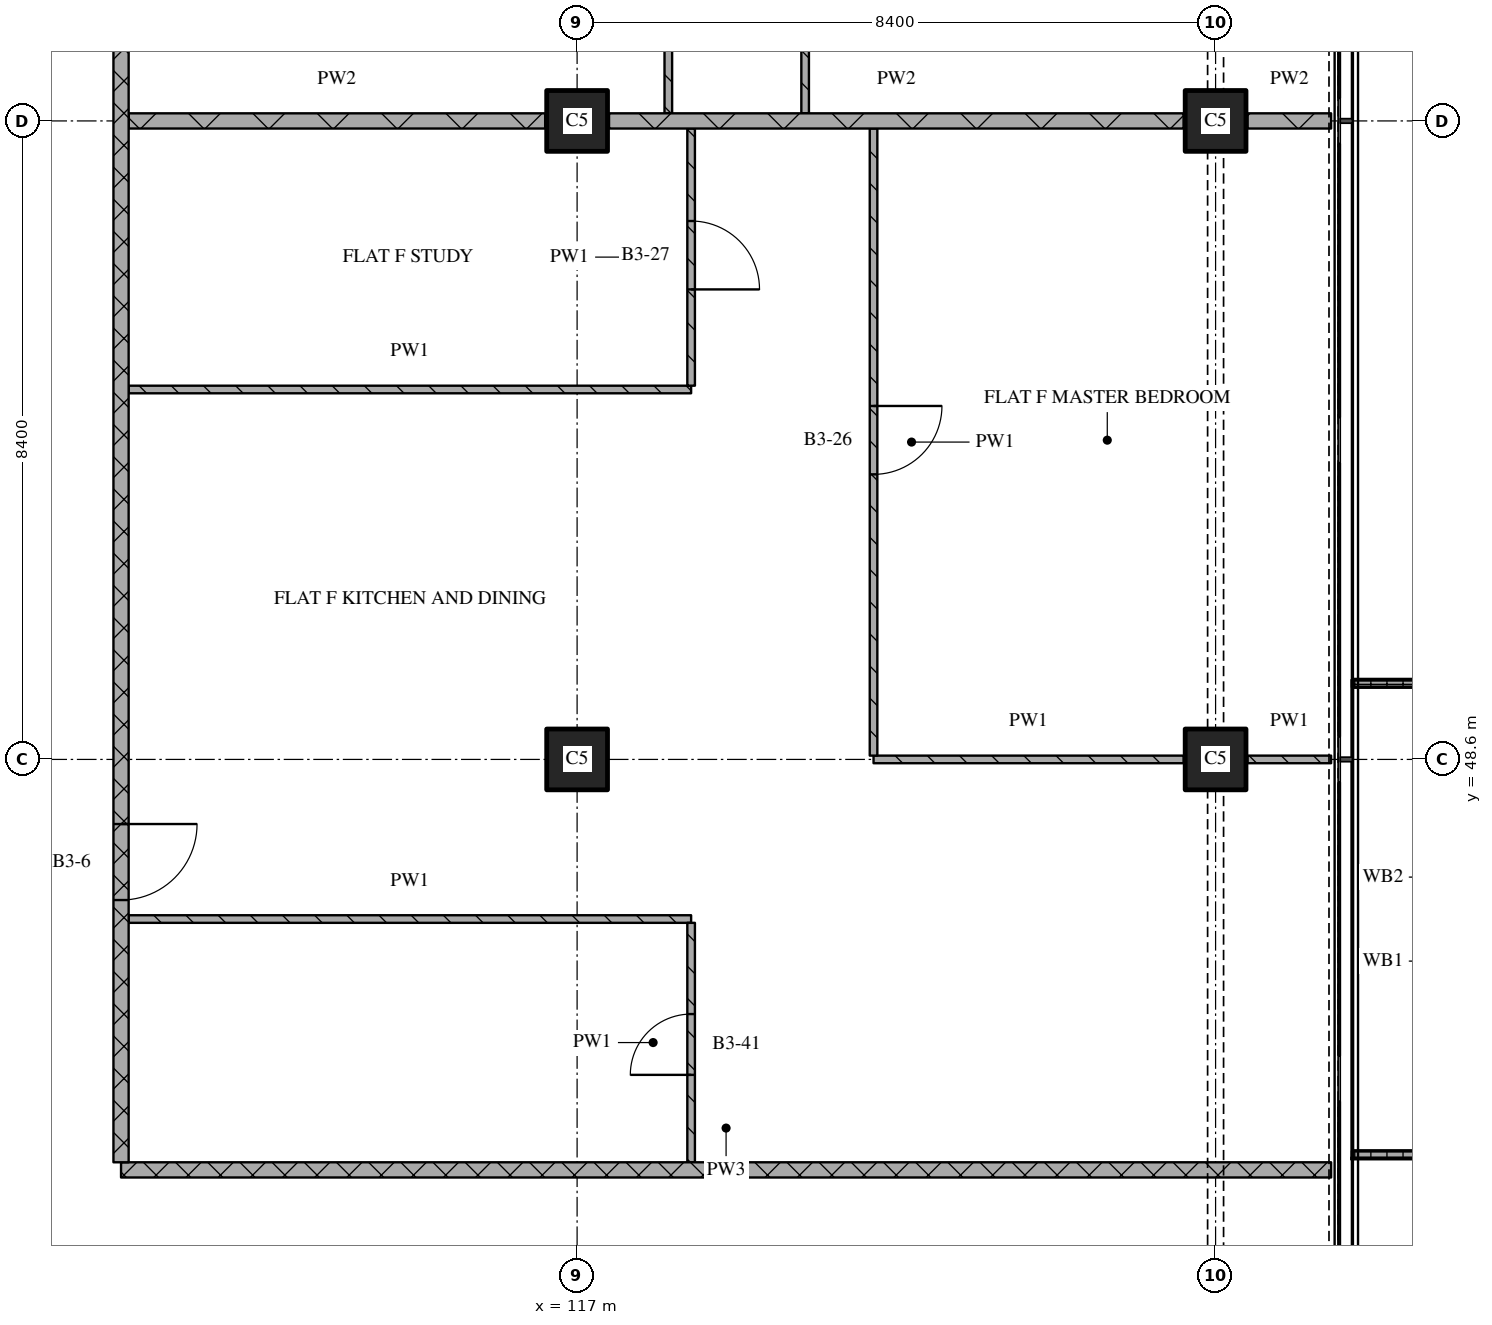
"""IFC4 building model, lengths in metres.
Left out: names, types, materials, properties, quantities, classifications, styles, units other than length and angle.
Written with IfcOpenShell. Run it as: python <this file> out.ifc"""

import sys

from ifc_helpers import new_model, si_unit, direction, frame, frame_2d, origin, origin_2d, place, context, subcontext, project, spatial, polyline, rectangle, outline, extrude, element, fill, save


model = new_model("IFC4")
c1 = context("Model", 3, precision=1e-05, world=origin(), true_north=direction((0.0, 1.0)))
c2 = subcontext(c1, "Body", "Model", "MODEL_VIEW")
j1 = project(units=[si_unit("LENGTHUNIT", "METRE"), si_unit("PLANEANGLEUNIT", "RADIAN")], contexts=[c1])
p1 = place(None, origin())
s1 = spatial("IfcSite", under=j1, at=p1, CompositionType="ELEMENT")
p2 = place(p1, origin())
s2 = spatial("IfcBuilding", under=s1, at=p2, CompositionType="ELEMENT")
p3 = place(p2, frame((0.0, 0.0, 116.85)))
s3 = spatial("IfcBuildingStorey", under=s2, at=p3, CompositionType="ELEMENT", Elevation=116.85)
for number, where, z_axis, x_axis in (
    (1, (117.0, 48.6, 0.0), (0.0, 0.0, 1.0), (1.0, 0.0, 0.0)),
    (2, (117.0, 57.0, 0.0), (0.0, 0.0, 1.0), (1.0, 0.0, 0.0)),
    (3, (125.4, 48.6, 0.0), (0.0, 0.0, 1.0), (1.0, 0.0, 0.0)),
    (4, (125.4, 57.0, 0.0), (0.0, 0.0, 1.0), (1.0, 0.0, 0.0)),
):
    element("IfcColumn", number, at=place(p3, frame(where, z_axis=z_axis, x_axis=x_axis)), inside=s3, PredefinedType="COLUMN", context=c2, shape_type="SweptSolid", body=[
        extrude(rectangle(XDim=0.8, YDim=0.8, at=origin_2d()), origin(), (0.0, 0.0, 1.0), 3.6),
    ])
p4 = place(p3, origin())
e5 = element("IfcWall", 5, at=p4, inside=s3, PredefinedType="SOLIDWALL", context=c2, shape_type="SweptSolid", body=[
    extrude(outline(polyline([(127.2, 43.35), (127.2, 43.45), (128.967, 43.45), (128.967, 49.55), (127.2, 49.55), (127.2, 49.65), (129.067, 49.65), (129.067, 43.35), (127.2, 43.35)])), origin(), (0.0, 0.0, 1.0), 1.0),
])
p5 = place(p3, frame((111.0, 43.2, 0.0), z_axis=(0.0, 0.0, 1.0), x_axis=(1.0, 0.0, 0.0)))
e6 = element("IfcWall", 6, at=p5, inside=s3, PredefinedType="PARTITIONING", context=c2, shape_type="SweptSolid", body=[
    extrude(rectangle(XDim=15.92, YDim=0.2, at=frame_2d((7.96, 0.0))), origin(), (0.0, 0.0, 1.0), 3.32),
])
p6 = place(p3, frame((111.1, 46.5, 0.0), z_axis=(0.0, 0.0, 1.0), x_axis=(1.0, 0.0, 0.0)))
e7 = element("IfcWall", 7, at=p6, inside=s3, PredefinedType="PARTITIONING", context=c2, shape_type="SweptSolid", body=[
    extrude(rectangle(XDim=7.4, YDim=0.1, at=frame_2d((3.7, 0.0))), origin(), (0.0, 0.0, 1.0), 3.32),
])
p7 = place(p3, frame((120.9, 48.6, 0.0), z_axis=(0.0, 0.0, 1.0), x_axis=(1.0, 0.0, 0.0)))
e8 = element("IfcWall", 8, at=p7, inside=s3, PredefinedType="PARTITIONING", context=c2, shape_type="SweptSolid", body=[
    extrude(rectangle(XDim=4.08, YDim=0.1, at=frame_2d((2.04, 0.0))), origin(), (0.0, 0.0, 1.0), 3.32),
])
p8 = place(p3, frame((125.82, 48.6, 0.0), z_axis=(0.0, 0.0, 1.0), x_axis=(1.0, 0.0, 0.0)))
e9 = element("IfcWall", 9, at=p8, inside=s3, PredefinedType="PARTITIONING", context=c2, shape_type="SweptSolid", body=[
    extrude(rectangle(XDim=1.1, YDim=0.1, at=frame_2d((0.55, 0.0))), origin(), (0.0, 0.0, 1.0), 3.32),
])
p9 = place(p3, frame((111.1, 53.467, 0.0), z_axis=(0.0, 0.0, 1.0), x_axis=(1.0, 0.0, 0.0)))
e10 = element("IfcWall", 10, at=p9, inside=s3, PredefinedType="PARTITIONING", context=c2, shape_type="SweptSolid", body=[
    extrude(rectangle(XDim=7.4, YDim=0.1, at=frame_2d((3.7, 0.0))), origin(), (0.0, 0.0, 1.0), 3.32),
])
p10 = place(p3, frame((111.1, 57.0, 0.0), z_axis=(0.0, 0.0, 1.0), x_axis=(1.0, 0.0, 0.0)))
e11 = element("IfcWall", 11, at=p10, inside=s3, PredefinedType="PARTITIONING", context=c2, shape_type="SweptSolid", body=[
    extrude(rectangle(XDim=5.48, YDim=0.2, at=frame_2d((2.74, 0.0))), origin(), (0.0, 0.0, 1.0), 3.32),
])
p11 = place(p3, frame((117.42, 57.0, 0.0), z_axis=(0.0, 0.0, 1.0), x_axis=(1.0, 0.0, 0.0)))
e12 = element("IfcWall", 12, at=p11, inside=s3, PredefinedType="PARTITIONING", context=c2, shape_type="SweptSolid", body=[
    extrude(rectangle(XDim=7.56, YDim=0.2, at=frame_2d((3.78, 0.0))), origin(), (0.0, 0.0, 1.0), 3.32),
])
p12 = place(p3, frame((125.82, 57.0, 0.0), z_axis=(0.0, 0.0, 1.0), x_axis=(1.0, 0.0, 0.0)))
e13 = element("IfcWall", 13, at=p12, inside=s3, PredefinedType="PARTITIONING", context=c2, shape_type="SweptSolid", body=[
    extrude(rectangle(XDim=1.1, YDim=0.2, at=frame_2d((0.55, 0.0))), origin(), (0.0, 0.0, 1.0), 3.32),
])
p13 = place(p3, frame((111.0, 75.32, 0.0), z_axis=(0.0, 0.0, 1.0), x_axis=(0.0, -1.0, 0.0)))
e14 = element("IfcWall", 14, at=p13, inside=s3, PredefinedType="PARTITIONING", context=c2, shape_type="SweptSolid", body=[
    extrude(rectangle(XDim=32.02, YDim=0.2, at=frame_2d((16.01, 0.0))), origin(), (0.0, 0.0, 1.0), 3.32),
])
p14 = place(p13, frame((11.37, 0.0, 0.0)))
e15 = element("IfcOpeningElement", 15, at=p14, cuts=e14, PredefinedType="OPENING", context=c2, shape_type="SweptSolid", body=[
    extrude(rectangle(XDim=1.0, YDim=2.1, at=frame_2d((0.5, 1.05))), frame((0.0, 0.11, 0.0), z_axis=(0.0, -1.0, 0.0), x_axis=(1.0, 0.0, 0.0)), (0.0, 0.0, 1.0), 0.22),
])
p15 = place(p13, frame((27.57, 0.0, 0.0)))
e16 = element("IfcOpeningElement", 16, at=p15, cuts=e14, PredefinedType="OPENING", context=c2, shape_type="SweptSolid", body=[
    extrude(rectangle(XDim=1.0, YDim=2.1, at=frame_2d((0.5, 1.05))), frame((0.0, 0.11, 0.0), z_axis=(0.0, -1.0, 0.0), x_axis=(1.0, 0.0, 0.0)), (0.0, 0.0, 1.0), 0.22),
])
p16 = place(p3, frame((118.2, 57.1, 0.0), z_axis=(0.0, 0.0, 1.0), x_axis=(0.0, 1.0, 0.0)))
e17 = element("IfcWall", 17, at=p16, inside=s3, PredefinedType="PARTITIONING", context=c2, shape_type="SweptSolid", body=[
    extrude(rectangle(XDim=5.55, YDim=0.1, at=frame_2d((2.775, 0.0))), origin(), (0.0, 0.0, 1.0), 3.32),
])
p17 = place(p16, frame((1.3, 0.0, 0.0)))
e18 = element("IfcOpeningElement", 18, at=p17, cuts=e17, PredefinedType="OPENING", context=c2, shape_type="SweptSolid", body=[
    extrude(rectangle(XDim=0.8, YDim=2.1, at=frame_2d((0.4, 1.05))), frame((0.0, 0.06, 0.0), z_axis=(0.0, -1.0, 0.0), x_axis=(1.0, 0.0, 0.0)), (0.0, 0.0, 1.0), 0.12),
])
p18 = place(p16, frame((4.15, 0.0, 0.0)))
e19 = element("IfcOpeningElement", 19, at=p18, cuts=e17, PredefinedType="OPENING", context=c2, shape_type="SweptSolid", body=[
    extrude(rectangle(XDim=0.8, YDim=2.1, at=frame_2d((0.4, 1.05))), frame((0.0, 0.06, 0.0), z_axis=(0.0, -1.0, 0.0), x_axis=(1.0, 0.0, 0.0)), (0.0, 0.0, 1.0), 0.12),
])
p19 = place(p3, frame((118.5, 43.3, 0.0), z_axis=(0.0, 0.0, 1.0), x_axis=(0.0, 1.0, 0.0)))
e20 = element("IfcWall", 20, at=p19, inside=s3, PredefinedType="PARTITIONING", context=c2, shape_type="SweptSolid", body=[
    extrude(rectangle(XDim=3.15, YDim=0.1, at=frame_2d((1.575, 0.0))), origin(), (0.0, 0.0, 1.0), 3.32),
])
p20 = place(p19, frame((1.15, 0.0, 0.0)))
e21 = element("IfcOpeningElement", 21, at=p20, cuts=e20, PredefinedType="OPENING", context=c2, shape_type="SweptSolid", body=[
    extrude(rectangle(XDim=0.8, YDim=2.1, at=frame_2d((0.4, 1.05))), frame((0.0, 0.06, 0.0), z_axis=(0.0, -1.0, 0.0), x_axis=(1.0, 0.0, 0.0)), (0.0, 0.0, 1.0), 0.12),
])
p21 = place(p3, frame((118.5, 53.517, 0.0), z_axis=(0.0, 0.0, 1.0), x_axis=(0.0, 1.0, 0.0)))
e22 = element("IfcWall", 22, at=p21, inside=s3, PredefinedType="PARTITIONING", context=c2, shape_type="SweptSolid", body=[
    extrude(rectangle(XDim=3.383, YDim=0.1, at=frame_2d((1.692, 0.0))), origin(), (0.0, 0.0, 1.0), 3.32),
])
p22 = place(p21, frame((1.267, 0.0, 0.0)))
e23 = element("IfcOpeningElement", 23, at=p22, cuts=e22, PredefinedType="OPENING", context=c2, shape_type="SweptSolid", body=[
    extrude(rectangle(XDim=0.9, YDim=2.1, at=frame_2d((0.45, 1.05))), frame((0.0, 0.06, 0.0), z_axis=(0.0, -1.0, 0.0), x_axis=(1.0, 0.0, 0.0)), (0.0, 0.0, 1.0), 0.12),
])
p23 = place(p3, frame((120.0, 65.35, 0.0), z_axis=(0.0, 0.0, 1.0), x_axis=(0.0, -1.0, 0.0)))
e24 = element("IfcWall", 24, at=p23, inside=s3, PredefinedType="PARTITIONING", context=c2, shape_type="SweptSolid", body=[
    extrude(rectangle(XDim=8.25, YDim=0.1, at=frame_2d((4.125, 0.0))), origin(), (0.0, 0.0, 1.0), 3.32),
])
p24 = place(p3, frame((120.9, 56.9, 0.0), z_axis=(0.0, 0.0, 1.0), x_axis=(0.0, -1.0, 0.0)))
e25 = element("IfcWall", 25, at=p24, inside=s3, PredefinedType="PARTITIONING", context=c2, shape_type="SweptSolid", body=[
    extrude(rectangle(XDim=8.25, YDim=0.1, at=frame_2d((4.125, 0.0))), origin(), (0.0, 0.0, 1.0), 3.32),
])
p25 = place(p24, frame((3.65, 0.0, 0.0)))
e26 = element("IfcOpeningElement", 26, at=p25, cuts=e25, PredefinedType="OPENING", context=c2, shape_type="SweptSolid", body=[
    extrude(rectangle(XDim=0.9, YDim=2.1, at=frame_2d((0.45, 1.05))), frame((0.0, 0.06, 0.0), z_axis=(0.0, -1.0, 0.0), x_axis=(1.0, 0.0, 0.0)), (0.0, 0.0, 1.0), 0.12),
])
p26 = place(p15, origin())
e27 = element("IfcDoor", 27, at=p26, inside=s3, OperationType="SINGLE_SWING_LEFT", PredefinedType="DOOR", context=c2, shape_type="SweptSolid", body=[
    extrude(rectangle(XDim=1.0, YDim=2.1, at=frame_2d((0.5, 1.05))), frame((0.0, 0.025, 0.0), z_axis=(0.0, -1.0, 0.0), x_axis=(1.0, 0.0, 0.0)), (0.0, 0.0, 1.0), 0.05),
])
fill(e16, e27)
p27 = place(p20, origin())
e28 = element("IfcDoor", 28, at=p27, inside=s3, OperationType="SINGLE_SWING_LEFT", PredefinedType="DOOR", context=c2, shape_type="SweptSolid", body=[
    extrude(rectangle(XDim=0.8, YDim=2.1, at=frame_2d((0.4, 1.05))), frame((0.0, 0.025, 0.0), z_axis=(0.0, -1.0, 0.0), x_axis=(1.0, 0.0, 0.0)), (0.0, 0.0, 1.0), 0.05),
])
fill(e21, e28)
p28 = place(p22, origin())
e29 = element("IfcDoor", 29, at=p28, inside=s3, OperationType="SINGLE_SWING_RIGHT", PredefinedType="DOOR", context=c2, shape_type="SweptSolid", body=[
    extrude(rectangle(XDim=0.9, YDim=2.1, at=frame_2d((0.45, 1.05))), frame((0.0, 0.025, 0.0), z_axis=(0.0, -1.0, 0.0), x_axis=(1.0, 0.0, 0.0)), (0.0, 0.0, 1.0), 0.05),
])
fill(e23, e29)
p29 = place(p25, origin())
e30 = element("IfcDoor", 30, at=p29, inside=s3, OperationType="SINGLE_SWING_LEFT", PredefinedType="DOOR", context=c2, shape_type="SweptSolid", body=[
    extrude(rectangle(XDim=0.9, YDim=2.1, at=frame_2d((0.45, 1.05))), frame((0.0, 0.025, 0.0), z_axis=(0.0, -1.0, 0.0), x_axis=(1.0, 0.0, 0.0)), (0.0, 0.0, 1.0), 0.05),
])
fill(e26, e30)
save(model, sys.argv[1])
